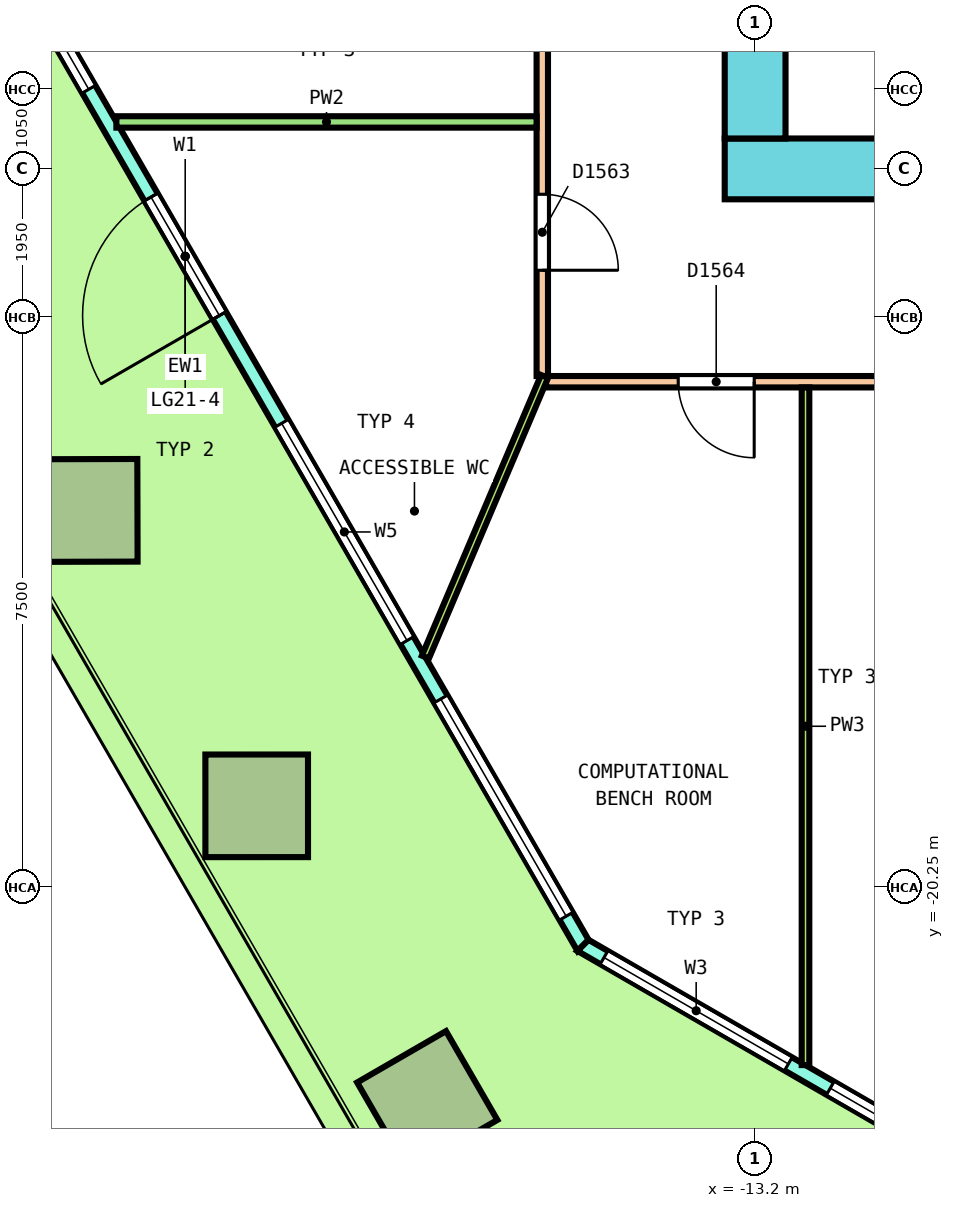
"""IFC4 building model, lengths in metres.
Left out: names, types, materials, properties, quantities, classifications, styles, units other than length and angle.
Written with IfcOpenShell. Run it as: python <this file> out.ifc"""

import sys

from ifc_helpers import new_model, si_unit, direction, frame, frame_2d, origin, origin_2d, place, context, subcontext, project, spatial, polyline, rectangle, outline, extrude, element, fill, save


model = new_model("IFC4")
c1 = context("Model", 3, precision=1e-05, world=origin(), true_north=direction((0.0, 1.0)))
c2 = subcontext(c1, "Body", "Model", "MODEL_VIEW")
j1 = project(units=[si_unit("LENGTHUNIT", "METRE"), si_unit("PLANEANGLEUNIT", "RADIAN")], contexts=[c1])
p1 = place(None, origin())
s1 = spatial("IfcSite", under=j1, at=p1, CompositionType="ELEMENT")
p2 = place(p1, origin())
s2 = spatial("IfcBuilding", under=s1, at=p2, CompositionType="ELEMENT")
p3 = place(p2, frame((0.0, 0.0, 98.4)))
s3 = spatial("IfcBuildingStorey", under=s2, at=p3, CompositionType="ELEMENT", Elevation=98.4)
p4 = place(p3, frame((-22.001, -15.293, 0.0), z_axis=(0.003616759812, -0.006269050341, 0.999973808685), x_axis=(0.501883236828, -0.864905101718, -0.007237514304)))
e1 = element("IfcColumn", 1, at=p4, inside=s3, PredefinedType="COLUMN", context=c2, shape_type="SweptSolid", body=[
    extrude(rectangle(XDim=1.35, YDim=1.35, at=origin_2d()), origin(), (0.0, 0.0, 1.0), 4.05),
])
p5 = place(p3, frame((-19.757, -19.179, 0.0), z_axis=(0.010908253887, -0.018863444567, 0.99976256204), x_axis=(0.500638377412, -0.865382225109, -0.021790354016)))
e2 = element("IfcColumn", 2, at=p5, inside=s3, PredefinedType="COLUMN", context=c2, shape_type="SweptSolid", body=[
    extrude(rectangle(XDim=1.35, YDim=1.35, at=origin_2d()), origin(), (0.0, 0.0, 1.0), 4.051),
])
p6 = place(p3, frame((-17.514, -23.065, 0.0), z_axis=(0.018132595726, -0.031445896907, 0.999340965106), x_axis=(0.865740985748, -0.499504693256, -0.031426215359)))
e3 = element("IfcColumn", 3, at=p6, inside=s3, PredefinedType="COLUMN", context=c2, shape_type="SweptSolid", body=[
    extrude(rectangle(XDim=1.35, YDim=1.35, at=origin_2d()), origin(), (0.0, 0.0, 1.0), 4.053),
])
p7 = place(p3, frame((-25.932, -2.884, 0.0), z_axis=(0.0, 0.0, 1.0), x_axis=(0.499999366442, -0.866025769569, 0.0)))
e4 = element("IfcWall", 4, at=p7, inside=s3, PredefinedType="SOLIDWALL", context=c2, shape_type="SweptSolid", body=[
    extrude(outline(polyline([(-0.027, -0.1), (1.023, -0.1), (2.072, -0.1), (3.122, -0.1), (4.171, -0.1), (5.221, -0.1), (6.27, -0.1), (7.32, -0.1), (8.369, -0.1), (9.419, -0.1), (10.468, -0.1), (11.518, -0.1), (12.567, -0.1), (13.617, -0.1), (14.666, -0.1), (15.716, -0.1), (16.765, -0.1), (17.815, -0.1), (18.864, -0.1), (19.914, -0.1), (20.963, -0.1), (20.91, 0.1), (19.865, 0.1), (18.821, 0.1), (17.777, 0.1), (16.733, 0.1), (15.689, 0.1), (14.645, 0.1), (13.601, 0.1), (12.557, 0.1), (11.512, 0.1), (10.468, 0.1), (9.424, 0.1), (8.38, 0.1), (7.336, 0.1), (6.292, 0.1), (5.248, 0.1), (4.203, 0.1), (3.159, 0.1), (2.115, 0.1), (1.071, 0.1), (0.027, 0.1), (-0.027, -0.1)])), origin(), (0.0, 0.0, 1.0), 4.1),
])
p8 = place(p7, frame((0.444, 0.0, 0.1)))
e5 = element("IfcOpeningElement", 5, at=p8, cuts=e4, PredefinedType="OPENING", context=c2, shape_type="SweptSolid", body=[
    extrude(rectangle(XDim=3.3, YDim=2.9, at=frame_2d((1.65, 1.45))), frame((0.0, 0.11, 0.0), z_axis=(0.0, -1.0, 0.0), x_axis=(1.0, 0.0, 0.0)), (0.0, 0.0, 1.0), 0.22),
])
p9 = place(p7, frame((4.631, 0.0, 0.1)))
e6 = element("IfcOpeningElement", 6, at=p9, cuts=e4, PredefinedType="OPENING", context=c2, shape_type="SweptSolid", body=[
    extrude(rectangle(XDim=3.3, YDim=2.9, at=frame_2d((1.65, 1.45))), frame((0.0, 0.11, 0.0), z_axis=(0.0, -1.0, 0.0), x_axis=(1.0, 0.0, 0.0)), (0.0, 0.0, 1.0), 0.22),
])
p10 = place(p7, frame((9.568, 0.0, 0.0)))
e7 = element("IfcOpeningElement", 7, at=p10, cuts=e4, PredefinedType="OPENING", context=c2, shape_type="SweptSolid", body=[
    extrude(rectangle(XDim=1.8, YDim=2.4, at=frame_2d((0.9, 1.2))), frame((0.0, 0.11, 0.0), z_axis=(0.0, -1.0, 0.0), x_axis=(1.0, 0.0, 0.0)), (0.0, 0.0, 1.0), 0.22),
])
p11 = place(p7, frame((9.568, 0.0, 2.55)))
e8 = element("IfcOpeningElement", 8, at=p11, cuts=e4, PredefinedType="OPENING", context=c2, shape_type="SweptSolid", body=[
    extrude(rectangle(XDim=1.8, YDim=0.45, at=frame_2d((0.9, 0.225))), frame((0.0, 0.11, 0.0), z_axis=(0.0, -1.0, 0.0), x_axis=(1.0, 0.0, 0.0)), (0.0, 0.0, 1.0), 0.22),
])
p12 = place(p7, frame((13.006, 0.0, 0.1)))
e9 = element("IfcOpeningElement", 9, at=p12, cuts=e4, PredefinedType="OPENING", context=c2, shape_type="SweptSolid", body=[
    extrude(rectangle(XDim=3.3, YDim=2.9, at=frame_2d((1.65, 1.45))), frame((0.0, 0.11, 0.0), z_axis=(0.0, -1.0, 0.0), x_axis=(1.0, 0.0, 0.0)), (0.0, 0.0, 1.0), 0.22),
])
p13 = place(p7, frame((17.193, 0.0, 0.1)))
e10 = element("IfcOpeningElement", 10, at=p13, cuts=e4, PredefinedType="OPENING", context=c2, shape_type="SweptSolid", body=[
    extrude(rectangle(XDim=3.3, YDim=2.9, at=frame_2d((1.65, 1.45))), frame((0.0, 0.11, 0.0), z_axis=(0.0, -1.0, 0.0), x_axis=(1.0, 0.0, 0.0)), (0.0, 0.0, 1.0), 0.22),
])
p14 = place(p3, frame((-15.464, -21.016, 0.0), z_axis=(0.0, 0.0, 1.0), x_axis=(0.866029458321, -0.49999297727, 0.0)))
e11 = element("IfcWall", 11, at=p14, inside=s3, PredefinedType="SOLIDWALL", context=c2, shape_type="SweptSolid", body=[
    extrude(outline(polyline([(-0.027, -0.1), (1.128, -0.1), (2.282, -0.1), (3.437, -0.1), (4.592, -0.1), (5.747, -0.1), (6.901, -0.1), (6.848, 0.1), (5.711, 0.1), (4.574, 0.1), (3.437, 0.1), (2.301, 0.1), (1.164, 0.1), (0.027, 0.1), (-0.027, -0.1)])), origin(), (0.0, 0.0, 1.0), 4.1),
])
p15 = place(p14, frame((0.319, 0.0, 0.1)))
e12 = element("IfcOpeningElement", 12, at=p15, cuts=e11, PredefinedType="OPENING", context=c2, shape_type="SweptSolid", body=[
    extrude(rectangle(XDim=2.8, YDim=2.9, at=frame_2d((1.4, 1.45))), frame((0.0, 0.11, 0.0), z_axis=(0.0, -1.0, 0.0), x_axis=(1.0, 0.0, 0.0)), (0.0, 0.0, 1.0), 0.22),
])
p16 = place(p14, frame((3.756, 0.0, 0.1)))
e13 = element("IfcOpeningElement", 13, at=p16, cuts=e11, PredefinedType="OPENING", context=c2, shape_type="SweptSolid", body=[
    extrude(rectangle(XDim=2.8, YDim=2.9, at=frame_2d((1.4, 1.45))), frame((0.0, 0.11, 0.0), z_axis=(0.0, -1.0, 0.0), x_axis=(1.0, 0.0, 0.0)), (0.0, 0.0, 1.0), 0.22),
])
p17 = place(p3, frame((-13.6, -10.8, 0.0), z_axis=(0.0, 0.0, 1.0), x_axis=(1.0, 0.0, 0.0)))
e14 = element("IfcWall", 14, at=p17, inside=s3, PredefinedType="SHEAR", context=c2, shape_type="SweptSolid", body=[
    extrude(rectangle(XDim=27.2, YDim=0.8, at=frame_2d((13.6, 0.0))), origin(), (0.0, 0.0, 1.0), 4.1),
])
p18 = place(p17, frame((2.333, 0.0, 0.0)))
e15 = element("IfcOpeningElement", 15, at=p18, cuts=e14, PredefinedType="OPENING", context=c2, shape_type="SweptSolid", body=[
    extrude(rectangle(XDim=1.0, YDim=2.1, at=frame_2d((0.5, 1.05))), frame((0.0, 0.41, 0.0), z_axis=(0.0, -1.0, 0.0), x_axis=(1.0, 0.0, 0.0)), (0.0, 0.0, 1.0), 0.82),
])
p19 = place(p17, frame((6.494, 0.0, 0.0)))
e16 = element("IfcOpeningElement", 16, at=p19, cuts=e14, PredefinedType="OPENING", context=c2, shape_type="SweptSolid", body=[
    extrude(rectangle(XDim=1.0, YDim=2.1, at=frame_2d((0.5, 1.05))), frame((0.0, 0.41, 0.0), z_axis=(0.0, -1.0, 0.0), x_axis=(1.0, 0.0, 0.0)), (0.0, 0.0, 1.0), 0.82),
])
p20 = place(p17, frame((10.623, 0.0, 0.0)))
e17 = element("IfcOpeningElement", 17, at=p20, cuts=e14, PredefinedType="OPENING", context=c2, shape_type="SweptSolid", body=[
    extrude(rectangle(XDim=1.0, YDim=2.1, at=frame_2d((0.5, 1.05))), frame((0.0, 0.41, 0.0), z_axis=(0.0, -1.0, 0.0), x_axis=(1.0, 0.0, 0.0)), (0.0, 0.0, 1.0), 0.82),
])
p21 = place(p17, frame((19.16, 0.0, 0.0)))
e18 = element("IfcOpeningElement", 18, at=p21, cuts=e14, PredefinedType="OPENING", context=c2, shape_type="SweptSolid", body=[
    extrude(rectangle(XDim=1.0, YDim=2.1, at=frame_2d((0.5, 1.05))), frame((0.0, 0.41, 0.0), z_axis=(0.0, -1.0, 0.0), x_axis=(1.0, 0.0, 0.0)), (0.0, 0.0, 1.0), 0.82),
])
p22 = place(p17, frame((21.856, 0.0, 0.0)))
e19 = element("IfcOpeningElement", 19, at=p22, cuts=e14, PredefinedType="OPENING", context=c2, shape_type="SweptSolid", body=[
    extrude(rectangle(XDim=1.0, YDim=2.1, at=frame_2d((0.5, 1.05))), frame((0.0, 0.41, 0.0), z_axis=(0.0, -1.0, 0.0), x_axis=(1.0, 0.0, 0.0)), (0.0, 0.0, 1.0), 0.82),
])
p23 = place(p17, frame((24.583, 0.0, 0.0)))
e20 = element("IfcOpeningElement", 20, at=p23, cuts=e14, PredefinedType="OPENING", context=c2, shape_type="SweptSolid", body=[
    extrude(rectangle(XDim=1.0, YDim=2.1, at=frame_2d((0.5, 1.05))), frame((0.0, 0.41, 0.0), z_axis=(0.0, -1.0, 0.0), x_axis=(1.0, 0.0, 0.0)), (0.0, 0.0, 1.0), 0.82),
])
p24 = place(p17, frame((15.15, 0.0, 0.0)))
e21 = element("IfcOpeningElement", 21, at=p24, cuts=e14, PredefinedType="OPENING", context=c2, shape_type="SweptSolid", body=[
    extrude(rectangle(XDim=1.2, YDim=2.1, at=frame_2d((0.6, 1.05))), frame((0.0, 0.41, 0.0), z_axis=(0.0, -1.0, 0.0), x_axis=(1.0, 0.0, 0.0)), (0.0, 0.0, 1.0), 0.82),
])
p25 = place(p3, frame((-13.2, -10.4, 0.0), z_axis=(0.0, 0.0, 1.0), x_axis=(0.0, 1.0, 0.0)))
e22 = element("IfcWall", 22, at=p25, inside=s3, PredefinedType="SHEAR", context=c2, shape_type="SweptSolid", body=[
    extrude(rectangle(XDim=20.8, YDim=0.8, at=frame_2d((10.4, 0.0))), origin(), (0.0, 0.0, 1.0), 4.1),
])
p26 = place(p25, frame((9.2, 0.0, 0.0)))
e23 = element("IfcOpeningElement", 23, at=p26, cuts=e22, PredefinedType="OPENING", context=c2, shape_type="SweptSolid", body=[
    extrude(rectangle(XDim=2.4, YDim=2.1, at=frame_2d((1.2, 1.05))), frame((0.0, 0.41, 0.0), z_axis=(0.0, -1.0, 0.0), x_axis=(1.0, 0.0, 0.0)), (0.0, 0.0, 1.0), 0.82),
])
p27 = place(p25, frame((16.1, 0.0, 0.0)))
e24 = element("IfcOpeningElement", 24, at=p27, cuts=e22, PredefinedType="OPENING", context=c2, shape_type="SweptSolid", body=[
    extrude(rectangle(XDim=1.2, YDim=2.1, at=frame_2d((0.6, 1.05))), frame((0.0, 0.41, 0.0), z_axis=(0.0, -1.0, 0.0), x_axis=(1.0, 0.0, 0.0)), (0.0, 0.0, 1.0), 0.82),
])
p28 = place(p25, frame((3.5, 0.0, 0.0)))
e25 = element("IfcOpeningElement", 25, at=p28, cuts=e22, PredefinedType="OPENING", context=c2, shape_type="SweptSolid", body=[
    extrude(rectangle(XDim=1.2, YDim=2.1, at=frame_2d((0.6, 1.05))), frame((0.0, 0.41, 0.0), z_axis=(0.0, -1.0, 0.0), x_axis=(1.0, 0.0, 0.0)), (0.0, 0.0, 1.0), 0.82),
])
p29 = place(p3, frame((-16.0, -13.525, 0.0), z_axis=(0.0, 0.0, 1.0), x_axis=(0.0, 1.0, 0.0)))
e26 = element("IfcWall", 26, at=p29, inside=s3, PredefinedType="PARTITIONING", context=c2, shape_type="SweptSolid", body=[
    extrude(rectangle(XDim=27.075, YDim=0.15, at=frame_2d((13.538, 0.0))), origin(), (0.0, 0.0, 1.0), 3.05),
])
p30 = place(p29, frame((24.819, 0.0, 0.0)))
e27 = element("IfcOpeningElement", 27, at=p30, cuts=e26, PredefinedType="OPENING", context=c2, shape_type="SweptSolid", body=[
    extrude(rectangle(XDim=1.0, YDim=2.1, at=frame_2d((0.5, 1.05))), frame((0.0, 0.085, 0.0), z_axis=(0.0, -1.0, 0.0), x_axis=(1.0, 0.0, 0.0)), (0.0, 0.0, 1.0), 0.17),
])
p31 = place(p29, frame((19.54, 0.0, 0.0)))
e28 = element("IfcOpeningElement", 28, at=p31, cuts=e26, PredefinedType="OPENING", context=c2, shape_type="SweptSolid", body=[
    extrude(rectangle(XDim=1.2, YDim=2.1, at=frame_2d((0.6, 1.05))), frame((0.0, 0.085, 0.0), z_axis=(0.0, -1.0, 0.0), x_axis=(1.0, 0.0, 0.0)), (0.0, 0.0, 1.0), 0.17),
])
p32 = place(p29, frame((14.735, 0.0, 0.0)))
e29 = element("IfcOpeningElement", 29, at=p32, cuts=e26, PredefinedType="OPENING", context=c2, shape_type="SweptSolid", body=[
    extrude(rectangle(XDim=1.2, YDim=2.1, at=frame_2d((0.6, 1.05))), frame((0.0, 0.085, 0.0), z_axis=(0.0, -1.0, 0.0), x_axis=(1.0, 0.0, 0.0)), (0.0, 0.0, 1.0), 0.17),
])
p33 = place(p29, frame((7.721, 0.0, 0.0)))
e30 = element("IfcOpeningElement", 30, at=p33, cuts=e26, PredefinedType="OPENING", context=c2, shape_type="SweptSolid", body=[
    extrude(rectangle(XDim=1.2, YDim=2.1, at=frame_2d((0.6, 1.05))), frame((0.0, 0.085, 0.0), z_axis=(0.0, -1.0, 0.0), x_axis=(1.0, 0.0, 0.0)), (0.0, 0.0, 1.0), 0.17),
])
p34 = place(p29, frame((1.392, 0.0, 0.0)))
e31 = element("IfcOpeningElement", 31, at=p34, cuts=e26, PredefinedType="OPENING", context=c2, shape_type="SweptSolid", body=[
    extrude(rectangle(XDim=1.0, YDim=2.1, at=frame_2d((0.5, 1.05))), frame((0.0, 0.085, 0.0), z_axis=(0.0, -1.0, 0.0), x_axis=(1.0, 0.0, 0.0)), (0.0, 0.0, 1.0), 0.17),
])
p35 = place(p3, frame((-15.95, -13.6, 0.0), z_axis=(0.0, 0.0, 1.0), x_axis=(1.0, 0.0, 0.0)))
e32 = element("IfcWall", 32, at=p35, inside=s3, PredefinedType="PARTITIONING", context=c2, shape_type="SweptSolid", body=[
    extrude(rectangle(XDim=31.9, YDim=0.15, at=frame_2d((15.95, 0.0))), origin(), (0.0, 0.0, 1.0), 3.05),
])
p36 = place(p35, frame((1.738, 0.0, 0.0)))
e33 = element("IfcOpeningElement", 33, at=p36, cuts=e32, PredefinedType="OPENING", context=c2, shape_type="SweptSolid", body=[
    extrude(rectangle(XDim=1.0, YDim=2.1, at=frame_2d((0.5, 1.05))), frame((0.0, 0.085, 0.0), z_axis=(0.0, -1.0, 0.0), x_axis=(1.0, 0.0, 0.0)), (0.0, 0.0, 1.0), 0.17),
])
p37 = place(p35, frame((7.599, 0.0, 0.0)))
e34 = element("IfcOpeningElement", 34, at=p37, cuts=e32, PredefinedType="OPENING", context=c2, shape_type="SweptSolid", body=[
    extrude(rectangle(XDim=1.0, YDim=2.1, at=frame_2d((0.5, 1.05))), frame((0.0, 0.085, 0.0), z_axis=(0.0, -1.0, 0.0), x_axis=(1.0, 0.0, 0.0)), (0.0, 0.0, 1.0), 0.17),
])
p38 = place(p35, frame((12.164, 0.0, 0.0)))
e35 = element("IfcOpeningElement", 35, at=p38, cuts=e32, PredefinedType="OPENING", context=c2, shape_type="SweptSolid", body=[
    extrude(rectangle(XDim=1.0, YDim=2.1, at=frame_2d((0.5, 1.05))), frame((0.0, 0.085, 0.0), z_axis=(0.0, -1.0, 0.0), x_axis=(1.0, 0.0, 0.0)), (0.0, 0.0, 1.0), 0.17),
])
p39 = place(p35, frame((17.257, 0.0, 0.0)))
e36 = element("IfcOpeningElement", 36, at=p39, cuts=e32, PredefinedType="OPENING", context=c2, shape_type="SweptSolid", body=[
    extrude(rectangle(XDim=1.2, YDim=2.1, at=frame_2d((0.6, 1.05))), frame((0.0, 0.085, 0.0), z_axis=(0.0, -1.0, 0.0), x_axis=(1.0, 0.0, 0.0)), (0.0, 0.0, 1.0), 0.17),
])
p40 = place(p35, frame((22.692, 0.0, 0.0)))
e37 = element("IfcOpeningElement", 37, at=p40, cuts=e32, PredefinedType="OPENING", context=c2, shape_type="SweptSolid", body=[
    extrude(rectangle(XDim=1.2, YDim=2.1, at=frame_2d((0.6, 1.05))), frame((0.0, 0.085, 0.0), z_axis=(0.0, -1.0, 0.0), x_axis=(1.0, 0.0, 0.0)), (0.0, 0.0, 1.0), 0.17),
])
p41 = place(p35, frame((27.887, 0.0, 0.0)))
e38 = element("IfcOpeningElement", 38, at=p41, cuts=e32, PredefinedType="OPENING", context=c2, shape_type="SweptSolid", body=[
    extrude(rectangle(XDim=1.2, YDim=2.1, at=frame_2d((0.6, 1.05))), frame((0.0, 0.085, 0.0), z_axis=(0.0, -1.0, 0.0), x_axis=(1.0, 0.0, 0.0)), (0.0, 0.0, 1.0), 0.17),
])
p42 = place(p3, frame((-21.603, -10.182, 0.0), z_axis=(0.0, 0.0, 1.0), x_axis=(1.0, 0.0, 0.0)))
e39 = element("IfcWall", 39, at=p42, inside=s3, PredefinedType="PARTITIONING", context=c2, shape_type="SweptSolid", body=[
    extrude(rectangle(XDim=5.528, YDim=0.15, at=frame_2d((2.764, 0.0))), origin(), (0.0, 0.0, 1.0), 3.05),
])
p43 = place(p3, frame((-17.538, -17.223, 0.0), z_axis=(0.0, 0.0, 1.0), x_axis=(0.390787441252, 0.92048094807, 0.0)))
e40 = element("IfcWall", 40, at=p43, inside=s3, PredefinedType="PARTITIONING", context=c2, shape_type="SweptSolid", body=[
    extrude(rectangle(XDim=4.011, YDim=0.1, at=frame_2d((2.005, 0.0))), origin(), (0.0, 0.0, 1.0), 3.05),
])
p44 = place(p3, frame((-12.537, -22.59, 0.0), z_axis=(0.0, 0.0, 1.0), x_axis=(0.0, 1.0, 0.0)))
e41 = element("IfcWall", 41, at=p44, inside=s3, PredefinedType="PARTITIONING", context=c2, shape_type="SweptSolid", body=[
    extrude(rectangle(XDim=8.915, YDim=0.1, at=frame_2d((4.458, 0.0))), origin(), (0.0, 0.0, 1.0), 3.05),
])
p45 = place(p9, origin())
e42 = element("IfcWindow", 42, at=p45, inside=s3, PartitioningType="SINGLE_PANEL", PredefinedType="WINDOW", context=c2, shape_type="SweptSolid", body=[
    extrude(rectangle(XDim=3.3, YDim=2.9, at=frame_2d((1.65, 1.45))), frame((0.0, 0.03, 0.0), z_axis=(0.0, -1.0, 0.0), x_axis=(1.0, 0.0, 0.0)), (0.0, 0.0, 1.0), 0.06),
])
fill(e6, e42)
p46 = place(p10, origin())
e43 = element("IfcDoor", 43, at=p46, inside=s3, OperationType="DOUBLE_DOOR_SINGLE_SWING", PredefinedType="DOOR", context=c2, shape_type="SweptSolid", body=[
    extrude(rectangle(XDim=1.8, YDim=2.4, at=frame_2d((0.9, 1.2))), frame((0.0, 0.025, 0.0), z_axis=(0.0, -1.0, 0.0), x_axis=(1.0, 0.0, 0.0)), (0.0, 0.0, 1.0), 0.05),
])
fill(e7, e43)
p47 = place(p11, origin())
e44 = element("IfcWindow", 44, at=p47, inside=s3, PartitioningType="SINGLE_PANEL", PredefinedType="WINDOW", context=c2, shape_type="SweptSolid", body=[
    extrude(rectangle(XDim=1.8, YDim=0.45, at=frame_2d((0.9, 0.225))), frame((0.0, 0.03, 0.0), z_axis=(0.0, -1.0, 0.0), x_axis=(1.0, 0.0, 0.0)), (0.0, 0.0, 1.0), 0.06),
])
fill(e8, e44)
p48 = place(p12, origin())
e45 = element("IfcWindow", 45, at=p48, inside=s3, PartitioningType="SINGLE_PANEL", PredefinedType="WINDOW", context=c2, shape_type="SweptSolid", body=[
    extrude(rectangle(XDim=3.3, YDim=2.9, at=frame_2d((1.65, 1.45))), frame((0.0, 0.03, 0.0), z_axis=(0.0, -1.0, 0.0), x_axis=(1.0, 0.0, 0.0)), (0.0, 0.0, 1.0), 0.06),
])
fill(e9, e45)
p49 = place(p13, origin())
e46 = element("IfcWindow", 46, at=p49, inside=s3, PartitioningType="SINGLE_PANEL", PredefinedType="WINDOW", context=c2, shape_type="SweptSolid", body=[
    extrude(rectangle(XDim=3.3, YDim=2.9, at=frame_2d((1.65, 1.45))), frame((0.0, 0.03, 0.0), z_axis=(0.0, -1.0, 0.0), x_axis=(1.0, 0.0, 0.0)), (0.0, 0.0, 1.0), 0.06),
])
fill(e10, e46)
p50 = place(p15, origin())
e47 = element("IfcWindow", 47, at=p50, inside=s3, PartitioningType="SINGLE_PANEL", PredefinedType="WINDOW", context=c2, shape_type="SweptSolid", body=[
    extrude(rectangle(XDim=2.8, YDim=2.9, at=frame_2d((1.4, 1.45))), frame((0.0, 0.03, 0.0), z_axis=(0.0, -1.0, 0.0), x_axis=(1.0, 0.0, 0.0)), (0.0, 0.0, 1.0), 0.06),
])
fill(e12, e47)
p51 = place(p16, origin())
e48 = element("IfcWindow", 48, at=p51, inside=s3, PartitioningType="SINGLE_PANEL", PredefinedType="WINDOW", context=c2, shape_type="SweptSolid", body=[
    extrude(rectangle(XDim=2.8, YDim=2.9, at=frame_2d((1.4, 1.45))), frame((0.0, 0.03, 0.0), z_axis=(0.0, -1.0, 0.0), x_axis=(1.0, 0.0, 0.0)), (0.0, 0.0, 1.0), 0.06),
])
fill(e13, e48)
p52 = place(p34, origin())
e49 = element("IfcDoor", 49, at=p52, inside=s3, OperationType="SINGLE_SWING_LEFT", PredefinedType="DOOR", context=c2, shape_type="SweptSolid", body=[
    extrude(rectangle(XDim=1.0, YDim=2.1, at=frame_2d((0.5, 1.05))), frame((0.0, 0.025, 0.0), z_axis=(0.0, -1.0, 0.0), x_axis=(1.0, 0.0, 0.0)), (0.0, 0.0, 1.0), 0.05),
])
fill(e31, e49)
p53 = place(p36, origin())
e50 = element("IfcDoor", 50, at=p53, inside=s3, OperationType="SINGLE_SWING_LEFT", PredefinedType="DOOR", context=c2, shape_type="SweptSolid", body=[
    extrude(rectangle(XDim=1.0, YDim=2.1, at=frame_2d((0.5, 1.05))), frame((0.0, 0.025, 0.0), z_axis=(0.0, -1.0, 0.0), x_axis=(1.0, 0.0, 0.0)), (0.0, 0.0, 1.0), 0.05),
])
fill(e33, e50)
save(model, sys.argv[1])
